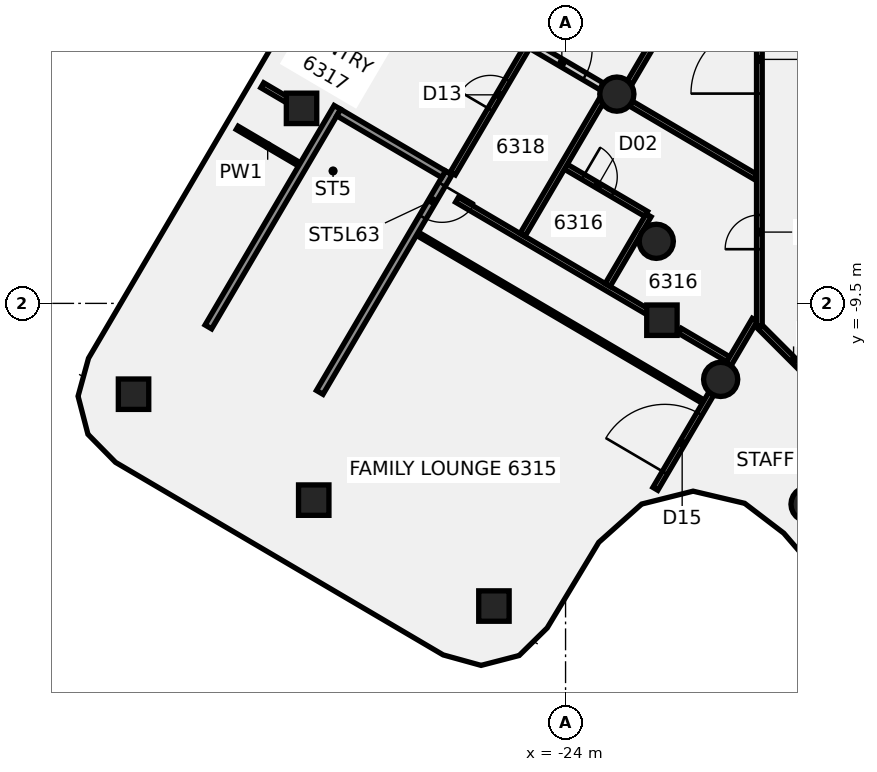
"""IFC4 building model, lengths in metres.
Left out: names, types, materials, properties, quantities, classifications, styles, units other than length and angle.
Written with IfcOpenShell. Run it as: python <this file> out.ifc"""

import sys

from ifc_helpers import new_model, si_unit, direction, frame, frame_2d, origin, origin_2d, place, context, subcontext, project, spatial, polyline, rectangle, circle, outline, extrude, element, fill, save


model = new_model("IFC4")
c1 = context("Model", 3, precision=1e-05, world=origin(), true_north=direction((0.0, 1.0)))
c2 = subcontext(c1, "Body", "Model", "MODEL_VIEW")
j1 = project(units=[si_unit("LENGTHUNIT", "METRE"), si_unit("PLANEANGLEUNIT", "RADIAN")], contexts=[c1])
p1 = place(None, origin())
s1 = spatial("IfcSite", under=j1, at=p1, CompositionType="ELEMENT")
p2 = place(p1, origin())
s2 = spatial("IfcBuilding", under=s1, at=p2, CompositionType="ELEMENT")
p3 = place(p2, frame((0.0, 0.0, 248.7)))
s3 = spatial("IfcBuildingStorey", under=s2, at=p3, CompositionType="ELEMENT", Elevation=248.7)
for number, where, z_axis, x_axis in (
    (1, (-22.651, -3.994, -0.14), (0.0, 0.0, 1.0), (1.0, 0.0, 0.0)),
    (2, (-21.613, -7.866, -0.14), (0.0, 0.0, 1.0), (1.0, 0.0, 0.0)),
    (3, (-19.919, -11.5, -0.14), (0.0, 0.0, 1.0), (1.0, 0.0, 0.0)),
    (4, (-17.619, -14.784, -0.14), (0.0, 0.0, 1.0), (1.0, 0.0, 0.0)),
):
    element("IfcColumn", number, at=place(p3, frame(where, z_axis=z_axis, x_axis=x_axis)), inside=s3, PredefinedType="COLUMN", context=c2, shape_type="SweptSolid", body=[
        extrude(circle(Radius=0.45, at=origin_2d()), origin(), (0.0, 0.0, 1.0), 3.56),
    ])
for number, where, z_axis, x_axis in (
    (5, (-21.464, -9.942, -0.139), (0.051, 0.003, 0.999), (-0.861, 0.507, 0.042)),
    (6, (-30.948, -4.368, -0.139), (0.023, -0.046, 0.999), (0.507, 0.861, 0.028)),
):
    element("IfcColumn", number, at=place(p3, frame(where, z_axis=z_axis, x_axis=x_axis)), inside=s3, PredefinedType="COLUMN", context=c2, shape_type="SweptSolid", body=[
        extrude(rectangle(XDim=0.8, YDim=0.8, at=origin_2d()), origin(), (0.0, 0.0, 1.0), 3.548),
    ])
p4 = place(p3, frame((-35.368, -11.89, -0.138), z_axis=(0.110853572272, 0.020643123328, 0.993622336189), x_axis=(-0.857166022761, 0.507964954346, 0.085076521909)))
e7 = element("IfcColumn", 7, at=p4, inside=s3, PredefinedType="COLUMN", context=c2, shape_type="SweptSolid", body=[
    extrude(rectangle(XDim=0.8, YDim=0.8, at=origin_2d()), origin(), (0.0, 0.0, 1.0), 3.548),
])
p5 = place(p3, frame((-30.626, -14.677, -0.138), z_axis=(0.124451230827, 0.044898703718, 0.991209361109), x_axis=(-0.857079762468, 0.508191525405, 0.084591100442)))
e8 = element("IfcColumn", 8, at=p5, inside=s3, PredefinedType="COLUMN", context=c2, shape_type="SweptSolid", body=[
    extrude(rectangle(XDim=0.8, YDim=0.8, at=origin_2d()), origin(), (0.0, 0.0, 1.0), 3.551),
])
p6 = place(p3, frame((-25.885, -17.464, -0.137), z_axis=(0.137913473061, 0.068853764798, 0.988048092464), x_axis=(-0.85645786001, 0.509328096398, 0.084052508864)))
e9 = element("IfcColumn", 9, at=p6, inside=s3, PredefinedType="COLUMN", context=c2, shape_type="SweptSolid", body=[
    extrude(rectangle(XDim=0.8, YDim=0.8, at=origin_2d()), origin(), (0.0, 0.0, 1.0), 3.556),
])
p7 = place(p3, frame((-18.872, -10.128, 0.0), z_axis=(0.0, 0.0, 1.0), x_axis=(0.707106781187, -0.707106781187, 0.0)))
e10 = element("IfcWall", 10, at=p7, inside=s3, PredefinedType="PARTITIONING", context=c2, shape_type="SweptSolid", body=[
    extrude(rectangle(XDim=2.465, YDim=0.15, at=frame_2d((1.232, 0.0))), origin(), (0.0, 0.0, 1.0), 2.824),
])
p8 = place(p3, frame((-32.64, -4.882, 0.0), z_axis=(0.0, 0.0, 1.0), x_axis=(0.862207561559, -0.506555150789, 0.0)))
e11 = element("IfcWall", 11, at=p8, inside=s3, PredefinedType="PARTITIONING", context=c2, shape_type="SweptSolid", body=[
    extrude(rectangle(XDim=1.859, YDim=0.1, at=frame_2d((0.929, 0.0))), origin(), (0.0, 0.0, 1.0), 2.82),
])
p9 = place(p3, frame((-27.865, -7.687, 0.0), z_axis=(0.0, 0.0, 1.0), x_axis=(0.862208691121, -0.506553228156, 0.0)))
e12 = element("IfcWall", 12, at=p9, inside=s3, PredefinedType="PARTITIONING", context=c2, shape_type="SweptSolid", body=[
    extrude(rectangle(XDim=8.685, YDim=0.1, at=frame_2d((4.343, 0.0))), origin(), (0.0, 0.0, 1.0), 2.82),
])
p10 = place(p3, frame((-31.981, -3.76, 0.0), z_axis=(0.0, 0.0, 1.0), x_axis=(0.86206768602, -0.506793157728, 0.0)))
e13 = element("IfcWall", 13, at=p10, inside=s3, PredefinedType="PARTITIONING", context=c2, shape_type="SweptSolid", body=[
    extrude(rectangle(XDim=0.799, YDim=0.15, at=frame_2d((0.4, 0.0))), origin(), (0.0, 0.0, 1.0), 2.824),
])
p11 = place(p3, frame((-26.857, -6.773, 0.0), z_axis=(0.0, 0.0, 1.0), x_axis=(0.862091797668, -0.506752140985, 0.0)))
e14 = element("IfcWall", 14, at=p11, inside=s3, PredefinedType="PARTITIONING", context=c2, shape_type="SweptSolid", body=[
    extrude(rectangle(XDim=5.853, YDim=0.15, at=frame_2d((2.927, 0.0))), origin(), (0.0, 0.0, 1.0), 2.82),
])
p12 = place(p3, frame((-20.99, -10.222, 0.0), z_axis=(0.0, 0.0, 1.0), x_axis=(0.862134928998, -0.506678758388, 0.0)))
e15 = element("IfcWall", 15, at=p12, inside=s3, PredefinedType="PARTITIONING", context=c2, shape_type="SweptSolid", body=[
    extrude(rectangle(XDim=1.469, YDim=0.15, at=frame_2d((0.735, 0.0))), origin(), (0.0, 0.0, 1.0), 2.82),
])
p13 = place(p3, frame((-29.701, 0.118, 0.0), z_axis=(0.0, 0.0, 1.0), x_axis=(0.862110841902, -0.506719741351, 0.0)))
e16 = element("IfcWall", 16, at=p13, inside=s3, PredefinedType="PARTITIONING", context=c2, shape_type="SweptSolid", body=[
    extrude(rectangle(XDim=7.708, YDim=0.2, at=frame_2d((3.854, 0.0))), origin(), (0.0, 0.0, 1.0), 2.824),
])
p14 = place(p13, frame((5.799, 0.0, 0.0)))
e17 = element("IfcOpeningElement", 17, at=p14, cuts=e16, PredefinedType="OPENING", context=c2, shape_type="SweptSolid", body=[
    extrude(rectangle(XDim=1.4, YDim=2.1, at=frame_2d((0.7, 1.05))), frame((0.0, 0.11, 0.0), z_axis=(0.0, -1.0, 0.0), x_axis=(1.0, 0.0, 0.0)), (0.0, 0.0, 1.0), 0.22),
])
p15 = place(p3, frame((-22.275, -4.246, 0.0), z_axis=(0.0, 0.0, 1.0), x_axis=(0.862128807231, -0.506689174685, 0.0)))
e18 = element("IfcWall", 18, at=p15, inside=s3, PredefinedType="PARTITIONING", context=c2, shape_type="SweptSolid", body=[
    extrude(rectangle(XDim=3.805, YDim=0.15, at=frame_2d((1.902, 0.0))), origin(), (0.0, 0.0, 1.0), 2.824),
])
p16 = place(p3, frame((-23.992, -5.905, 0.0), z_axis=(0.0, 0.0, 1.0), x_axis=(0.862238889769, -0.506501823263, 0.0)))
e19 = element("IfcWall", 19, at=p16, inside=s3, PredefinedType="PARTITIONING", context=c2, shape_type="SweptSolid", body=[
    extrude(rectangle(XDim=2.45, YDim=0.15, at=frame_2d((1.225, 0.0))), origin(), (0.0, 0.0, 1.0), 2.824),
])
p17 = place(p16, frame((0.525, 0.0, 0.0)))
e20 = element("IfcOpeningElement", 20, at=p17, cuts=e19, PredefinedType="OPENING", context=c2, shape_type="SweptSolid", body=[
    extrude(rectangle(XDim=0.9, YDim=2.1, at=frame_2d((0.45, 1.05))), frame((0.0, 0.085, 0.0), z_axis=(0.0, -1.0, 0.0), x_axis=(1.0, 0.0, 0.0)), (0.0, 0.0, 1.0), 0.17),
])
p18 = place(p3, frame((-26.967, -6.082, 0.0), z_axis=(0.0, 0.0, 1.0), x_axis=(0.506735370339, 0.862101655518, 0.0)))
e21 = element("IfcWall", 21, at=p18, inside=s3, PredefinedType="PARTITIONING", context=c2, shape_type="SweptSolid", body=[
    extrude(rectangle(XDim=3.86, YDim=0.15, at=frame_2d((1.93, 0.0))), origin(), (0.0, 0.0, 1.0), 2.72),
])
p19 = place(p18, frame((1.95, 0.0, 0.0)))
e22 = element("IfcOpeningElement", 22, at=p19, cuts=e21, PredefinedType="OPENING", context=c2, shape_type="SweptSolid", body=[
    extrude(rectangle(XDim=0.9, YDim=2.1, at=frame_2d((0.45, 1.05))), frame((0.0, 0.085, 0.0), z_axis=(0.0, -1.0, 0.0), x_axis=(1.0, 0.0, 0.0)), (0.0, 0.0, 1.0), 0.17),
])
p20 = place(p3, frame((-25.131, -7.695, 0.0), z_axis=(0.0, 0.0, 1.0), x_axis=(0.506385167167, 0.862307406018, 0.0)))
e23 = element("IfcWall", 23, at=p20, inside=s3, PredefinedType="PARTITIONING", context=c2, shape_type="SweptSolid", body=[
    extrude(rectangle(XDim=4.084, YDim=0.15, at=frame_2d((2.042, 0.0))), origin(), (0.0, 0.0, 1.0), 2.72),
])
p21 = place(p3, frame((-22.892, -9.016, 0.0), z_axis=(0.0, 0.0, 1.0), x_axis=(0.506789195044, 0.862070015594, 0.0)))
e24 = element("IfcWall", 24, at=p21, inside=s3, PredefinedType="PARTITIONING", context=c2, shape_type="SweptSolid", body=[
    extrude(rectangle(XDim=2.125, YDim=0.15, at=frame_2d((1.063, 0.0))), origin(), (0.0, 0.0, 1.0), 2.72),
])
p22 = place(p3, frame((-22.318, -3.698, 0.0), z_axis=(0.0, 0.0, 1.0), x_axis=(0.506670752559, 0.862139633993, 0.0)))
e25 = element("IfcWall", 25, at=p22, inside=s3, PredefinedType="PARTITIONING", context=c2, shape_type="SweptSolid", body=[
    extrude(rectangle(XDim=6.505, YDim=0.15, at=frame_2d((3.253, 0.0))), origin(), (0.0, 0.0, 1.0), 2.824),
])
p23 = place(p3, frame((-21.637, -14.379, 0.0), z_axis=(0.0, 0.0, 1.0), x_axis=(0.506773579249, 0.862079195536, 0.0)))
e26 = element("IfcWall", 26, at=p23, inside=s3, PredefinedType="PARTITIONING", context=c2, shape_type="SweptSolid", body=[
    extrude(rectangle(XDim=2.9, YDim=0.15, at=frame_2d((1.45, 0.0))), origin(), (0.0, 0.0, 1.0), 2.824),
])
p24 = place(p23, frame((0.491, 0.0, 0.0)))
e27 = element("IfcOpeningElement", 27, at=p24, cuts=e26, PredefinedType="OPENING", context=c2, shape_type="SweptSolid", body=[
    extrude(rectangle(XDim=1.8, YDim=2.1, at=frame_2d((0.9, 1.05))), frame((0.0, 0.085, 0.0), z_axis=(0.0, -1.0, 0.0), x_axis=(1.0, 0.0, 0.0)), (0.0, 0.0, 1.0), 0.17),
])
p25 = place(p3, frame((-19.707, -11.097, 0.0), z_axis=(0.0, 0.0, 1.0), x_axis=(0.506775518667, 0.862078055445, 0.0)))
e28 = element("IfcWall", 28, at=p25, inside=s3, PredefinedType="PARTITIONING", context=c2, shape_type="SweptSolid", body=[
    extrude(rectangle(XDim=1.352, YDim=0.15, at=frame_2d((0.676, 0.0))), origin(), (0.0, 0.0, 1.0), 2.824),
])
p26 = place(p3, frame((-18.9, -10.1, 0.0), z_axis=(0.0, 0.0, 1.0), x_axis=(0.0, 1.0, 0.0)))
e29 = element("IfcWall", 29, at=p26, inside=s3, PredefinedType="PARTITIONING", context=c2, shape_type="SweptSolid", body=[
    extrude(rectangle(XDim=20.2, YDim=0.15, at=frame_2d((10.1, 0.0))), origin(), (0.0, 0.0, 1.0), 2.824),
])
p27 = place(p26, frame((14.767, 0.0, 0.0)))
e30 = element("IfcOpeningElement", 30, at=p27, cuts=e29, PredefinedType="OPENING", context=c2, shape_type="SweptSolid", body=[
    extrude(rectangle(XDim=1.8, YDim=2.1, at=frame_2d((0.9, 1.05))), frame((0.0, 0.085, 0.0), z_axis=(0.0, -1.0, 0.0), x_axis=(1.0, 0.0, 0.0)), (0.0, 0.0, 1.0), 0.17),
])
p28 = place(p26, frame((6.12, 0.0, 0.0)))
e31 = element("IfcOpeningElement", 31, at=p28, cuts=e29, PredefinedType="OPENING", context=c2, shape_type="SweptSolid", body=[
    extrude(rectangle(XDim=1.8, YDim=2.1, at=frame_2d((0.9, 1.05))), frame((0.0, 0.085, 0.0), z_axis=(0.0, -1.0, 0.0), x_axis=(1.0, 0.0, 0.0)), (0.0, 0.0, 1.0), 0.17),
])
p29 = place(p26, frame((2.026, 0.0, 0.0)))
e32 = element("IfcOpeningElement", 32, at=p29, cuts=e29, PredefinedType="OPENING", context=c2, shape_type="SweptSolid", body=[
    extrude(rectangle(XDim=0.9, YDim=2.1, at=frame_2d((0.45, 1.05))), frame((0.0, 0.085, 0.0), z_axis=(0.0, -1.0, 0.0), x_axis=(1.0, 0.0, 0.0)), (0.0, 0.0, 1.0), 0.17),
])
p30 = place(p3, frame((-27.073, -6.066, -0.14), z_axis=(0.0, 0.0, 1.0), x_axis=(-0.506720715415, -0.86211026938, 0.0)))
e33 = element("IfcWall", 33, at=p30, inside=s3, PredefinedType="SHEAR", context=c2, shape_type="SweptSolid", body=[
    extrude(rectangle(XDim=6.7, YDim=0.2, at=frame_2d((3.35, 0.0))), origin(), (0.0, 0.0, 1.0), 2.86),
])
p31 = place(p30, frame((0.35, 0.0, 0.0)))
e34 = element("IfcOpeningElement", 34, at=p31, cuts=e33, PredefinedType="OPENING", context=c2, shape_type="SweptSolid", body=[
    extrude(rectangle(XDim=1.0, YDim=2.1, at=frame_2d((0.5, 1.05))), frame((0.0, 0.11, 0.0), z_axis=(0.0, -1.0, 0.0), x_axis=(1.0, 0.0, 0.0)), (0.0, 0.0, 1.0), 0.22),
])
p32 = place(p3, frame((-30.004, -4.343, -0.14), z_axis=(0.0, 0.0, 1.0), x_axis=(-0.506720715415, -0.86211026938, 0.0)))
e35 = element("IfcWall", 35, at=p32, inside=s3, PredefinedType="SHEAR", context=c2, shape_type="SweptSolid", body=[
    extrude(rectangle(XDim=6.7, YDim=0.2, at=frame_2d((3.35, 0.0))), origin(), (0.0, 0.0, 1.0), 2.86),
])
p33 = place(p3, frame((-29.969, -4.48, -0.14), z_axis=(0.0, 0.0, 1.0), x_axis=(0.862102834216, -0.506733365032, 0.0)))
e36 = element("IfcWall", 36, at=p33, inside=s3, PredefinedType="SHEAR", context=c2, shape_type="SweptSolid", body=[
    extrude(rectangle(XDim=3.2, YDim=0.2, at=frame_2d((1.6, 0.0))), origin(), (0.0, 0.0, 1.0), 2.86),
])
p34 = place(p3, frame((0.0, 0.0, -0.14)))
e37 = element("IfcWall", 37, at=p34, inside=s3, PredefinedType="SHEAR", context=c2, shape_type="SweptSolid", body=[
    extrude(outline(polyline([(-33.212, -9.997), (-33.313, -10.169), (-30.555, -11.791), (-30.453, -11.619), (-33.212, -9.997)])), origin(), (0.0, 0.0, 1.0), 2.96),
])
p35 = place(p14, origin())
e38 = element("IfcDoor", 38, at=p35, inside=s3, OperationType="DOUBLE_DOOR_SINGLE_SWING", PredefinedType="DOOR", context=c2, shape_type="SweptSolid", body=[
    extrude(rectangle(XDim=1.4, YDim=2.1, at=frame_2d((0.7, 1.05))), frame((0.0, 0.025, 0.0), z_axis=(0.0, -1.0, 0.0), x_axis=(1.0, 0.0, 0.0)), (0.0, 0.0, 1.0), 0.05),
])
fill(e17, e38)
p36 = place(p17, frame((0.9, 0.0, 0.0), z_axis=(0.0, 0.0, 1.0), x_axis=(-1.0, 0.0, 0.0)))
e39 = element("IfcDoor", 39, at=p36, inside=s3, OperationType="SINGLE_SWING_LEFT", PredefinedType="DOOR", context=c2, shape_type="SweptSolid", body=[
    extrude(rectangle(XDim=0.9, YDim=2.1, at=frame_2d((0.45, 1.05))), frame((0.0, 0.025, 0.0), z_axis=(0.0, -1.0, 0.0), x_axis=(1.0, 0.0, 0.0)), (0.0, 0.0, 1.0), 0.05),
])
fill(e20, e39)
p37 = place(p19, origin())
e40 = element("IfcDoor", 40, at=p37, inside=s3, OperationType="SINGLE_SWING_LEFT", PredefinedType="DOOR", context=c2, shape_type="SweptSolid", body=[
    extrude(rectangle(XDim=0.9, YDim=2.1, at=frame_2d((0.45, 1.05))), frame((0.0, 0.025, 0.0), z_axis=(0.0, -1.0, 0.0), x_axis=(1.0, 0.0, 0.0)), (0.0, 0.0, 1.0), 0.05),
])
fill(e22, e40)
p38 = place(p24, origin())
e41 = element("IfcDoor", 41, at=p38, inside=s3, OperationType="DOUBLE_DOOR_SINGLE_SWING", PredefinedType="DOOR", context=c2, shape_type="SweptSolid", body=[
    extrude(rectangle(XDim=1.8, YDim=2.1, at=frame_2d((0.9, 1.05))), frame((0.0, 0.025, 0.0), z_axis=(0.0, -1.0, 0.0), x_axis=(1.0, 0.0, 0.0)), (0.0, 0.0, 1.0), 0.05),
])
fill(e27, e41)
p39 = place(p28, origin())
e42 = element("IfcDoor", 42, at=p39, inside=s3, OperationType="DOUBLE_DOOR_SINGLE_SWING", PredefinedType="DOOR", context=c2, shape_type="SweptSolid", body=[
    extrude(rectangle(XDim=1.8, YDim=2.1, at=frame_2d((0.9, 1.05))), frame((0.0, 0.025, 0.0), z_axis=(0.0, -1.0, 0.0), x_axis=(1.0, 0.0, 0.0)), (0.0, 0.0, 1.0), 0.05),
])
fill(e31, e42)
p40 = place(p29, origin())
e43 = element("IfcDoor", 43, at=p40, inside=s3, OperationType="SINGLE_SWING_RIGHT", PredefinedType="DOOR", context=c2, shape_type="SweptSolid", body=[
    extrude(rectangle(XDim=0.9, YDim=2.1, at=frame_2d((0.45, 1.05))), frame((0.0, 0.025, 0.0), z_axis=(0.0, -1.0, 0.0), x_axis=(1.0, 0.0, 0.0)), (0.0, 0.0, 1.0), 0.05),
])
fill(e32, e43)
p41 = place(p31, origin())
e44 = element("IfcDoor", 44, at=p41, inside=s3, OperationType="SINGLE_SWING_LEFT", PredefinedType="DOOR", context=c2, shape_type="SweptSolid", body=[
    extrude(rectangle(XDim=1.0, YDim=2.1, at=frame_2d((0.5, 1.05))), frame((0.0, 0.025, 0.0), z_axis=(0.0, -1.0, 0.0), x_axis=(1.0, 0.0, 0.0)), (0.0, 0.0, 1.0), 0.05),
])
fill(e34, e44)
save(model, sys.argv[1])
